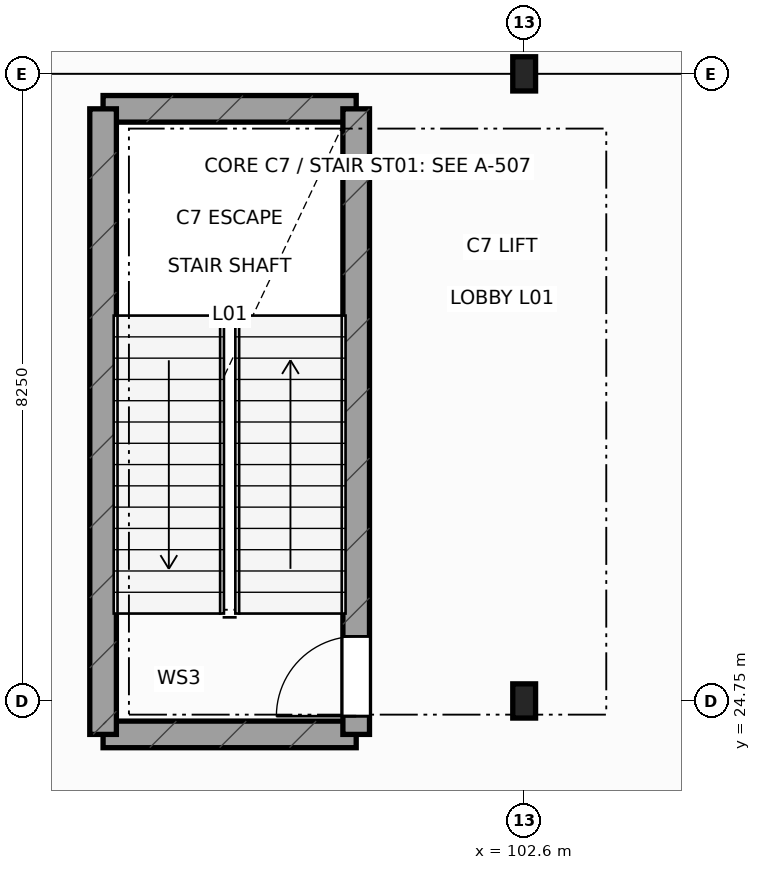
"""IFC4 building model, lengths in metres.
Left out: names, types, materials, properties, quantities, classifications, styles, units other than length and angle.
Written with IfcOpenShell. Run it as: python <this file> out.ifc"""

import sys

from ifc_helpers import new_model, si_unit, direction, frame, frame_2d, origin, origin_2d, place, context, subcontext, project, spatial, rectangle, i_section, extrude, element, fill, save


model = new_model("IFC4")
c1 = context("Model", 3, precision=1e-05, world=origin(), true_north=direction((0.0, 1.0)))
c2 = subcontext(c1, "Body", "Model", "MODEL_VIEW")
j1 = project(units=[si_unit("LENGTHUNIT", "METRE"), si_unit("PLANEANGLEUNIT", "RADIAN")], contexts=[c1])
p1 = place(None, origin())
s1 = spatial("IfcSite", under=j1, at=p1, CompositionType="ELEMENT")
p2 = place(p1, origin())
s2 = spatial("IfcBuilding", under=s1, at=p2, CompositionType="ELEMENT")
p3 = place(p2, frame((0.0, 0.0, 6.0)))
s3 = spatial("IfcBuildingStorey", under=s2, at=p3, CompositionType="ELEMENT", Elevation=6.0)
for number, where, z_axis, x_axis in (
    (1, (102.6, 24.75, 0.0), (0.0, 0.0, 1.0), (1.0, 0.0, 0.0)),
    (2, (102.6, 33.0, 0.0), (0.0, 0.0, 1.0), (1.0, 0.0, 0.0)),
):
    element("IfcColumn", number, at=place(p3, frame(where, z_axis=z_axis, x_axis=x_axis)), inside=s3, PredefinedType="COLUMN", context=c2, shape_type="SweptSolid", body=[
        extrude(i_section(OverallWidth=0.3, OverallDepth=0.45, WebThickness=0.014, FlangeThickness=0.026, at=origin_2d()), origin(), (0.0, 0.0, 1.0), 5.4),
    ])
for number, where, z_axis, x_axis in (
    (3, (97.06, 24.31, 0.0), (0.0, 0.0, 1.0), (1.0, 0.0, 0.0)),
    (4, (97.06, 32.54, 0.0), (0.0, 0.0, 1.0), (1.0, 0.0, 0.0)),
):
    element("IfcWall", number, at=place(p3, frame(where, z_axis=z_axis, x_axis=x_axis)), inside=s3, PredefinedType="SHEAR", context=c2, shape_type="SweptSolid", body=[
        extrude(rectangle(XDim=3.33, YDim=0.35, at=frame_2d((1.665, 0.0))), origin(), (0.0, 0.0, 1.0), 5.05),
    ])
p4 = place(p3, frame((97.06, 24.31, 0.0), z_axis=(0.0, 0.0, 1.0), x_axis=(0.0, 1.0, 0.0)))
e5 = element("IfcWall", 5, at=p4, inside=s3, PredefinedType="SHEAR", context=c2, shape_type="SweptSolid", body=[
    extrude(rectangle(XDim=8.23, YDim=0.35, at=frame_2d((4.115, 0.0))), origin(), (0.0, 0.0, 1.0), 5.05),
])
p5 = place(p3, frame((100.39, 24.31, 0.0), z_axis=(0.0, 0.0, 1.0), x_axis=(0.0, 1.0, 0.0)))
e6 = element("IfcWall", 6, at=p5, inside=s3, PredefinedType="SHEAR", context=c2, shape_type="SweptSolid", body=[
    extrude(rectangle(XDim=8.23, YDim=0.35, at=frame_2d((4.115, 0.0))), origin(), (0.0, 0.0, 1.0), 5.05),
])
p6 = place(p5, frame((0.24, 0.0, 0.0)))
e7 = element("IfcOpeningElement", 7, at=p6, cuts=e6, PredefinedType="OPENING", context=c2, shape_type="SweptSolid", body=[
    extrude(rectangle(XDim=1.05, YDim=2.18, at=frame_2d((0.525, 1.09))), frame((0.0, 0.185, 0.0), z_axis=(0.0, -1.0, 0.0), x_axis=(1.0, 0.0, 0.0)), (0.0, 0.0, 1.0), 0.37),
])
p7 = place(p6, origin())
e8 = element("IfcDoor", 8, at=p7, inside=s3, OperationType="SINGLE_SWING_LEFT", PredefinedType="DOOR", context=c2, shape_type="SweptSolid", body=[
    extrude(rectangle(XDim=1.05, YDim=2.18, at=frame_2d((0.525, 1.09))), frame((0.0, 0.025, 0.0), z_axis=(0.0, -1.0, 0.0), x_axis=(1.0, 0.0, 0.0)), (0.0, 0.0, 1.0), 0.05),
])
fill(e7, e8)
save(model, sys.argv[1])
